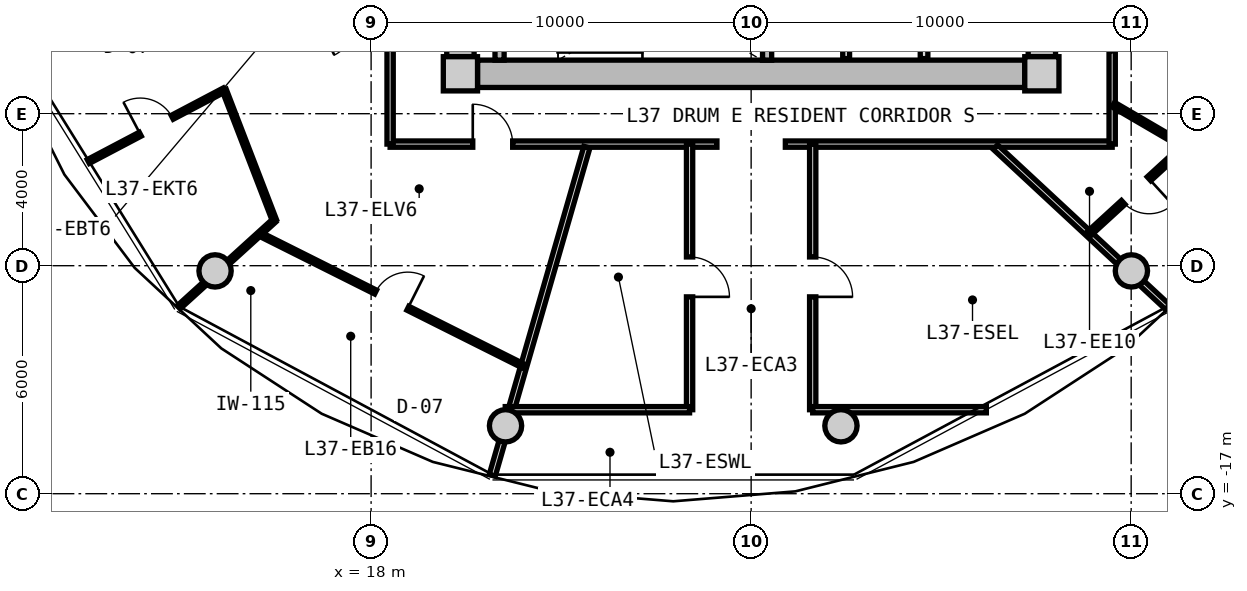
"""IFC4 building model, lengths in metres.
Left out: names, types, materials, properties, quantities, classifications, styles, units other than length and angle.
Written with IfcOpenShell. Run it as: python <this file> out.ifc"""

import sys

from ifc_helpers import new_model, si_unit, direction, frame, frame_2d, origin, origin_2d, place, context, subcontext, project, spatial, rectangle, circle, extrude, source, transform, mapped, element, fill, save


model = new_model("IFC4")
c1 = context("Model", 3, precision=1e-05, world=origin(), true_north=direction((0.0, 1.0)))
c2 = subcontext(c1, "Body", "Model", "MODEL_VIEW")
j1 = project(units=[si_unit("LENGTHUNIT", "METRE"), si_unit("PLANEANGLEUNIT", "RADIAN")], contexts=[c1])
p1 = place(None, origin())
s1 = spatial("IfcSite", under=j1, at=p1, CompositionType="ELEMENT")
p2 = place(p1, origin())
s2 = spatial("IfcBuilding", under=s1, at=p2, CompositionType="ELEMENT")
p3 = place(p2, frame((0.0, 0.0, 120.65)))
s3 = spatial("IfcBuildingStorey", under=s2, at=p3, CompositionType="ELEMENT", Elevation=120.65)
m1 = source(origin(), c2, "Body", "SweptSolid", [
    extrude(rectangle(XDim=0.9, YDim=0.9, at=origin_2d()), origin(), (0.0, 0.0, 1.0), 3.05),
])
for number, where, z_axis, x_axis in (
    (1, (20.35, -5.95, 0.0), (0.0, 0.0, 1.0), (1.0, 0.0, 0.0)),
    (2, (35.65, -5.95, 0.0), (0.0, 0.0, 1.0), (1.0, 0.0, 0.0)),
):
    element("IfcColumn", number, at=place(p3, frame(where, z_axis=z_axis, x_axis=x_axis)), inside=s3, PredefinedType="COLUMN", context=c2, shape_type="MappedRepresentation", body=[
        mapped(m1, transform((0.0, 0.0, 0.0), x_axis=(1.0, 0.0, 0.0), y_axis=(0.0, 1.0, 0.0), z_axis=(0.0, 0.0, 1.0), scale=1.0)),
    ])
m2 = source(origin(), c2, "Body", "SweptSolid", [
    extrude(rectangle(XDim=14.4, YDim=0.72, at=frame_2d((7.2, 0.0))), origin(), (0.0, 0.0, 1.0), 2.79),
])
p4 = place(p3, frame((35.2, -5.95, 0.0), z_axis=(0.0, 0.0, 1.0), x_axis=(-1.0, 0.0, 0.0)))
e3 = element("IfcWall", 3, at=p4, inside=s3, PredefinedType="SHEAR", context=c2, shape_type="MappedRepresentation", body=[
    mapped(m2, transform((0.0, 0.0, 0.0), x_axis=(1.0, 0.0, 0.0), y_axis=(0.0, 1.0, 0.0), z_axis=(0.0, 0.0, 1.0), scale=1.0)),
])
m3 = source(origin(), c2, "Body", "SweptSolid", [
    extrude(rectangle(XDim=11.0, YDim=0.72, at=frame_2d((5.5, 0.0))), origin(), (0.0, 0.0, 1.0), 2.79),
])
p5 = place(p3, frame((20.35, -5.5, 0.0), z_axis=(0.0, 0.0, 1.0), x_axis=(0.0, 1.0, 0.0)))
e4 = element("IfcWall", 4, at=p5, inside=s3, PredefinedType="SHEAR", context=c2, shape_type="MappedRepresentation", body=[
    mapped(m3, transform((0.0, 0.0, 0.0), x_axis=(1.0, 0.0, 0.0), y_axis=(0.0, 1.0, 0.0), z_axis=(0.0, 0.0, 1.0), scale=1.0)),
])
p6 = place(p5, frame((3.8, 0.0, 0.0)))
e5 = element("IfcOpeningElement", 5, at=p6, cuts=e4, PredefinedType="OPENING", context=c2, shape_type="SweptSolid", body=[
    extrude(rectangle(XDim=1.2, YDim=2.15, at=frame_2d((0.6, 1.075))), frame((0.0, 0.37, 0.0), z_axis=(0.0, -1.0, 0.0), x_axis=(1.0, 0.0, 0.0)), (0.0, 0.0, 1.0), 0.74),
])
p7 = place(p3, frame((35.65, 5.5, 0.0), z_axis=(0.0, 0.0, 1.0), x_axis=(0.0, -1.0, 0.0)))
e6 = element("IfcWall", 6, at=p7, inside=s3, PredefinedType="SHEAR", context=c2, shape_type="MappedRepresentation", body=[
    mapped(m3, transform((0.0, 0.0, 0.0), x_axis=(1.0, 0.0, 0.0), y_axis=(0.0, 1.0, 0.0), z_axis=(0.0, 0.0, 1.0), scale=1.0)),
])
p8 = place(p7, frame((5.65, 0.0, 0.0)))
e7 = element("IfcOpeningElement", 7, at=p8, cuts=e6, PredefinedType="OPENING", context=c2, shape_type="SweptSolid", body=[
    extrude(rectangle(XDim=1.2, YDim=2.15, at=frame_2d((0.6, 1.075))), frame((0.0, 0.37, 0.0), z_axis=(0.0, -1.0, 0.0), x_axis=(1.0, 0.0, 0.0)), (0.0, 0.0, 1.0), 0.74),
])
m4 = source(origin(), c2, "Body", "SweptSolid", [
    extrude(circle(Radius=0.425, at=origin_2d()), origin(), (0.0, 0.0, 1.0), 3.05),
])
for number, where, z_axis, x_axis in (
    (8, (13.894, -11.137, 0.0), (0.0, 0.0, 1.0), (1.0, 0.0, 0.0)),
    (9, (21.537, -15.213, 0.0), (0.0, 0.0, 1.0), (1.0, 0.0, 0.0)),
    (10, (30.363, -15.213, 0.0), (0.0, 0.0, 1.0), (1.0, 0.0, 0.0)),
    (11, (38.006, -11.137, 0.0), (0.0, 0.0, 1.0), (1.0, 0.0, 0.0)),
):
    element("IfcColumn", number, at=place(p3, frame(where, z_axis=z_axis, x_axis=x_axis)), inside=s3, PredefinedType="COLUMN", context=c2, shape_type="MappedRepresentation", body=[
        mapped(m4, transform((0.0, 0.0, 0.0), x_axis=(1.0, 0.0, 0.0), y_axis=(0.0, 1.0, 0.0), z_axis=(0.0, 0.0, 1.0), scale=1.0)),
    ])
m5 = source(origin(), c2, "Body", "SweptSolid", [
    extrude(rectangle(XDim=3.14, YDim=0.24, at=frame_2d((1.57, 0.0))), origin(), (0.0, 0.0, 1.0), 2.79),
])
for number, where, z_axis, x_axis in (
    (12, (21.38, -5.59, 0.0), (0.0, 0.0, 1.0), (0.0, 1.0, 0.0)),
    (13, (28.42, -5.59, 0.0), (0.0, 0.0, 1.0), (0.0, 1.0, 0.0)),
):
    element("IfcWall", number, at=place(p3, frame(where, z_axis=z_axis, x_axis=x_axis)), inside=s3, PredefinedType="PARTITIONING", context=c2, shape_type="MappedRepresentation", body=[
        mapped(m5, transform((0.0, 0.0, 0.0), x_axis=(1.0, 0.0, 0.0), y_axis=(0.0, 1.0, 0.0), z_axis=(0.0, 0.0, 1.0), scale=1.0)),
    ])
m6 = source(origin(), c2, "Body", "SweptSolid", [
    extrude(rectangle(XDim=3.8, YDim=0.2, at=frame_2d((1.9, 0.0))), origin(), (0.0, 0.0, 1.0), 2.775),
])
p9 = place(p3, frame((32.55, -5.55, 0.0), z_axis=(0.0, 0.0, 1.0), x_axis=(0.0, 1.0, 0.0)))
e14 = element("IfcWall", 14, at=p9, inside=s3, PredefinedType="PARTITIONING", context=c2, shape_type="MappedRepresentation", body=[
    mapped(m6, transform((0.0, 0.0, 0.0), x_axis=(1.0, 0.0, 0.0), y_axis=(0.0, 1.0, 0.0), z_axis=(0.0, 0.0, 1.0), scale=1.0)),
])
m7 = source(origin(), c2, "Body", "SweptSolid", [
    extrude(rectangle(XDim=3.22, YDim=0.18, at=frame_2d((1.61, 0.0))), origin(), (0.0, 0.0, 1.0), 2.775),
])
p10 = place(p3, frame((30.5, -5.55, 0.0), z_axis=(0.0, 0.0, 1.0), x_axis=(0.0, 1.0, 0.0)))
e15 = element("IfcWall", 15, at=p10, inside=s3, PredefinedType="PARTITIONING", context=c2, shape_type="MappedRepresentation", body=[
    mapped(m7, transform((0.0, 0.0, 0.0), x_axis=(1.0, 0.0, 0.0), y_axis=(0.0, 1.0, 0.0), z_axis=(0.0, 0.0, 1.0), scale=1.0)),
])
m8 = source(origin(), c2, "Body", "SweptSolid", [
    extrude(rectangle(XDim=8.6, YDim=0.165, at=frame_2d((4.3, 0.0))), origin(), (0.0, 0.0, 1.0), 2.775),
])
p11 = place(p3, frame((37.5, -7.8, 0.0), z_axis=(0.0, 0.0, 1.0), x_axis=(-1.0, 0.0, 0.0)))
e16 = element("IfcWall", 16, at=p11, inside=s3, PredefinedType="PARTITIONING", context=c2, shape_type="MappedRepresentation", body=[
    mapped(m8, transform((0.0, 0.0, 0.0), x_axis=(1.0, 0.0, 0.0), y_axis=(0.0, 1.0, 0.0), z_axis=(0.0, 0.0, 1.0), scale=1.0)),
])
p12 = place(p3, frame((27.1, -7.8, 0.0), z_axis=(0.0, 0.0, 1.0), x_axis=(-1.0, 0.0, 0.0)))
e17 = element("IfcWall", 17, at=p12, inside=s3, PredefinedType="PARTITIONING", context=c2, shape_type="MappedRepresentation", body=[
    mapped(m8, transform((0.0, 0.0, 0.0), x_axis=(1.0, 0.0, 0.0), y_axis=(0.0, 1.0, 0.0), z_axis=(0.0, 0.0, 1.0), scale=1.0)),
])
p13 = place(p12, frame((5.375, 0.0, 0.0)))
e18 = element("IfcOpeningElement", 18, at=p13, cuts=e17, PredefinedType="OPENING", context=c2, shape_type="SweptSolid", body=[
    extrude(rectangle(XDim=1.05, YDim=2.15, at=frame_2d((0.525, 1.075))), frame((0.0, 0.093, 0.0), z_axis=(0.0, -1.0, 0.0), x_axis=(1.0, 0.0, 0.0)), (0.0, 0.0, 1.0), 0.185),
])
m9 = source(origin(), c2, "Body", "SweptSolid", [
    extrude(rectangle(XDim=15.6, YDim=0.165, at=frame_2d((7.8, 0.0))), origin(), (0.0, 0.0, 1.0), 2.775),
])
p14 = place(p3, frame((18.5, -7.8, 0.0), z_axis=(0.0, 0.0, 1.0), x_axis=(0.0, 1.0, 0.0)))
e19 = element("IfcWall", 19, at=p14, inside=s3, PredefinedType="PARTITIONING", context=c2, shape_type="MappedRepresentation", body=[
    mapped(m9, transform((0.0, 0.0, 0.0), x_axis=(1.0, 0.0, 0.0), y_axis=(0.0, 1.0, 0.0), z_axis=(0.0, 0.0, 1.0), scale=1.0)),
])
p15 = place(p14, frame((10.383, 0.0, 0.0)))
e20 = element("IfcOpeningElement", 20, at=p15, cuts=e19, PredefinedType="OPENING", context=c2, shape_type="SweptSolid", body=[
    extrude(rectangle(XDim=1.05, YDim=2.15, at=frame_2d((0.525, 1.075))), frame((0.0, 0.093, 0.0), z_axis=(0.0, -1.0, 0.0), x_axis=(1.0, 0.0, 0.0)), (0.0, 0.0, 1.0), 0.185),
])
p16 = place(p14, frame((6.419, 0.0, 0.0)))
e21 = element("IfcOpeningElement", 21, at=p16, cuts=e19, PredefinedType="OPENING", context=c2, shape_type="SweptSolid", body=[
    extrude(rectangle(XDim=1.05, YDim=2.15, at=frame_2d((0.525, 1.075))), frame((0.0, 0.093, 0.0), z_axis=(0.0, -1.0, 0.0), x_axis=(1.0, 0.0, 0.0)), (0.0, 0.0, 1.0), 0.185),
])
p17 = place(p3, frame((37.5, 7.8, 0.0), z_axis=(0.0, 0.0, 1.0), x_axis=(0.0, -1.0, 0.0)))
e22 = element("IfcWall", 22, at=p17, inside=s3, PredefinedType="PARTITIONING", context=c2, shape_type="MappedRepresentation", body=[
    mapped(m9, transform((0.0, 0.0, 0.0), x_axis=(1.0, 0.0, 0.0), y_axis=(0.0, 1.0, 0.0), z_axis=(0.0, 0.0, 1.0), scale=1.0)),
])
p18 = place(p17, frame((12.094, 0.0, 0.0)))
e23 = element("IfcOpeningElement", 23, at=p18, cuts=e22, PredefinedType="OPENING", context=c2, shape_type="SweptSolid", body=[
    extrude(rectangle(XDim=1.05, YDim=2.15, at=frame_2d((0.525, 1.075))), frame((0.0, 0.093, 0.0), z_axis=(0.0, -1.0, 0.0), x_axis=(1.0, 0.0, 0.0)), (0.0, 0.0, 1.0), 0.185),
])
p19 = place(p17, frame((5.971, 0.0, 0.0)))
e24 = element("IfcOpeningElement", 24, at=p19, cuts=e22, PredefinedType="OPENING", context=c2, shape_type="SweptSolid", body=[
    extrude(rectangle(XDim=1.05, YDim=2.15, at=frame_2d((0.525, 1.075))), frame((0.0, 0.093, 0.0), z_axis=(0.0, -1.0, 0.0), x_axis=(1.0, 0.0, 0.0)), (0.0, 0.0, 1.0), 0.185),
])
p20 = place(p17, frame((3.324, 0.0, 0.0)))
e25 = element("IfcOpeningElement", 25, at=p20, cuts=e22, PredefinedType="OPENING", context=c2, shape_type="SweptSolid", body=[
    extrude(rectangle(XDim=0.92, YDim=2.1, at=frame_2d((0.46, 1.05))), frame((0.0, 0.093, 0.0), z_axis=(0.0, -1.0, 0.0), x_axis=(1.0, 0.0, 0.0)), (0.0, 0.0, 1.0), 0.185),
])
m10 = source(origin(), c2, "Body", "SweptSolid", [
    extrude(rectangle(XDim=8.989, YDim=0.165, at=frame_2d((4.495, 0.0))), origin(), (0.0, 0.0, 1.0), 2.275),
])
p21 = place(p3, frame((23.678, -7.88, 0.0), z_axis=(0.0, 0.0, 1.0), x_axis=(-0.27702323008, -0.960863221274, 0.0)))
e26 = element("IfcWall", 26, at=p21, inside=s3, PredefinedType="PARTITIONING", context=c2, shape_type="MappedRepresentation", body=[
    mapped(m10, transform((0.0, 0.0, 0.0), x_axis=(1.0, 0.0, 0.0), y_axis=(0.0, 1.0, 0.0), z_axis=(0.0, 0.0, 1.0), scale=1.0)),
])
m11 = source(origin(), c2, "Body", "SweptSolid", [
    extrude(rectangle(XDim=6.187, YDim=0.165, at=frame_2d((3.093, 0.0))), origin(), (0.0, 0.0, 1.0), 2.275),
])
p22 = place(p3, frame((34.429, -7.88, 0.0), z_axis=(0.0, 0.0, 1.0), x_axis=(0.732501077882, -0.680765870841, 0.0)))
e27 = element("IfcWall", 27, at=p22, inside=s3, PredefinedType="PARTITIONING", context=c2, shape_type="MappedRepresentation", body=[
    mapped(m11, transform((0.0, 0.0, 0.0), x_axis=(1.0, 0.0, 0.0), y_axis=(0.0, 1.0, 0.0), z_axis=(0.0, 0.0, 1.0), scale=1.0)),
])
m12 = source(origin(), c2, "Body", "SweptSolid", [
    extrude(rectangle(XDim=6.99, YDim=0.165, at=frame_2d((3.495, 0.0))), origin(), (0.0, 0.0, 1.0), 2.775),
])
p23 = place(p3, frame((26.38, -14.79, 0.0), z_axis=(0.0, 0.0, 1.0), x_axis=(0.0, 1.0, 0.0)))
e28 = element("IfcWall", 28, at=p23, inside=s3, PredefinedType="PARTITIONING", context=c2, shape_type="MappedRepresentation", body=[
    mapped(m12, transform((0.0, 0.0, 0.0), x_axis=(1.0, 0.0, 0.0), y_axis=(0.0, 1.0, 0.0), z_axis=(0.0, 0.0, 1.0), scale=1.0)),
])
p24 = place(p23, frame((2.97, 0.0, 0.0)))
e29 = element("IfcOpeningElement", 29, at=p24, cuts=e28, PredefinedType="OPENING", context=c2, shape_type="SweptSolid", body=[
    extrude(rectangle(XDim=1.05, YDim=2.15, at=frame_2d((0.525, 1.075))), frame((0.0, 0.093, 0.0), z_axis=(0.0, -1.0, 0.0), x_axis=(1.0, 0.0, 0.0)), (0.0, 0.0, 1.0), 0.185),
])
m13 = source(origin(), c2, "Body", "SweptSolid", [
    extrude(rectangle(XDim=4.851, YDim=0.165, at=frame_2d((2.425, 0.0))), origin(), (0.0, 0.0, 1.0), 2.775),
])
p25 = place(p3, frame((21.529, -14.79, 0.0), z_axis=(0.0, 0.0, 1.0), x_axis=(1.0, 0.0, 0.0)))
e30 = element("IfcWall", 30, at=p25, inside=s3, PredefinedType="PARTITIONING", context=c2, shape_type="MappedRepresentation", body=[
    mapped(m13, transform((0.0, 0.0, 0.0), x_axis=(1.0, 0.0, 0.0), y_axis=(0.0, 1.0, 0.0), z_axis=(0.0, 0.0, 1.0), scale=1.0)),
])
m14 = source(origin(), c2, "Body", "SweptSolid", [
    extrude(rectangle(XDim=6.99, YDim=0.165, at=frame_2d((3.495, 0.0))), origin(), (0.0, 0.0, 1.0), 2.275),
])
p26 = place(p3, frame((29.62, -14.79, 0.0), z_axis=(0.0, 0.0, 1.0), x_axis=(0.0, 1.0, 0.0)))
e31 = element("IfcWall", 31, at=p26, inside=s3, PredefinedType="PARTITIONING", context=c2, shape_type="MappedRepresentation", body=[
    mapped(m14, transform((0.0, 0.0, 0.0), x_axis=(1.0, 0.0, 0.0), y_axis=(0.0, 1.0, 0.0), z_axis=(0.0, 0.0, 1.0), scale=1.0)),
])
p27 = place(p26, frame((2.97, 0.0, 0.0)))
e32 = element("IfcOpeningElement", 32, at=p27, cuts=e31, PredefinedType="OPENING", context=c2, shape_type="SweptSolid", body=[
    extrude(rectangle(XDim=1.05, YDim=2.15, at=frame_2d((0.525, 1.075))), frame((0.0, 0.093, 0.0), z_axis=(0.0, -1.0, 0.0), x_axis=(1.0, 0.0, 0.0)), (0.0, 0.0, 1.0), 0.185),
])
m15 = source(origin(), c2, "Body", "SweptSolid", [
    extrude(rectangle(XDim=4.569, YDim=0.165, at=frame_2d((2.285, 0.0))), origin(), (0.0, 0.0, 1.0), 2.775),
])
p28 = place(p3, frame((29.62, -14.79, 0.0), z_axis=(0.0, 0.0, 1.0), x_axis=(1.0, 0.0, 0.0)))
e33 = element("IfcWall", 33, at=p28, inside=s3, PredefinedType="PARTITIONING", context=c2, shape_type="MappedRepresentation", body=[
    mapped(m15, transform((0.0, 0.0, 0.0), x_axis=(1.0, 0.0, 0.0), y_axis=(0.0, 1.0, 0.0), z_axis=(0.0, 0.0, 1.0), scale=1.0)),
])
m16 = source(origin(), c2, "Body", "SweptSolid", [
    extrude(rectangle(XDim=7.767, YDim=0.115, at=frame_2d((3.884, 0.0))), origin(), (0.0, 0.0, 1.0), 2.775),
])
p29 = place(p3, frame((15.07, -10.167, 0.0), z_axis=(0.0, 0.0, 1.0), x_axis=(0.894188177352, -0.447691303783, 0.0)))
e34 = element("IfcWall", 34, at=p29, inside=s3, PredefinedType="PARTITIONING", context=c2, shape_type="MappedRepresentation", body=[
    mapped(m16, transform((0.0, 0.0, 0.0), x_axis=(1.0, 0.0, 0.0), y_axis=(0.0, 1.0, 0.0), z_axis=(0.0, 0.0, 1.0), scale=1.0)),
])
p30 = place(p29, frame((3.409, 0.0, 0.0)))
e35 = element("IfcOpeningElement", 35, at=p30, cuts=e34, PredefinedType="OPENING", context=c2, shape_type="SweptSolid", body=[
    extrude(rectangle(XDim=0.95, YDim=2.1, at=frame_2d((0.475, 1.05))), frame((0.0, 0.067, 0.0), z_axis=(0.0, -1.0, 0.0), x_axis=(1.0, 0.0, 0.0)), (0.0, 0.0, 1.0), 0.135),
])
m17 = source(origin(), c2, "Body", "SweptSolid", [
    extrude(rectangle(XDim=3.393, YDim=0.115, at=frame_2d((1.696, 0.0))), origin(), (0.0, 0.0, 1.0), 2.275),
])
p31 = place(p3, frame((15.451, -9.811, 0.0), z_axis=(0.0, 0.0, 1.0), x_axis=(-0.740356690907, -0.672214229416, 0.0)))
e36 = element("IfcWall", 36, at=p31, inside=s3, PredefinedType="PARTITIONING", context=c2, shape_type="MappedRepresentation", body=[
    mapped(m17, transform((0.0, 0.0, 0.0), x_axis=(1.0, 0.0, 0.0), y_axis=(0.0, 1.0, 0.0), z_axis=(0.0, 0.0, 1.0), scale=1.0)),
])
m18 = source(origin(), c2, "Body", "SweptSolid", [
    extrude(rectangle(XDim=4.042, YDim=0.115, at=frame_2d((2.021, 0.0))), origin(), (0.0, 0.0, 1.0), 2.775),
])
p32 = place(p3, frame((14.134, -6.375, 0.0), z_axis=(0.0, 0.0, 1.0), x_axis=(-0.88476748851, -0.466032714812, 0.0)))
e37 = element("IfcWall", 37, at=p32, inside=s3, PredefinedType="PARTITIONING", context=c2, shape_type="MappedRepresentation", body=[
    mapped(m18, transform((0.0, 0.0, 0.0), x_axis=(1.0, 0.0, 0.0), y_axis=(0.0, 1.0, 0.0), z_axis=(0.0, 0.0, 1.0), scale=1.0)),
])
p33 = place(p32, frame((1.546, 0.0, 0.0)))
e38 = element("IfcOpeningElement", 38, at=p33, cuts=e37, PredefinedType="OPENING", context=c2, shape_type="SweptSolid", body=[
    extrude(rectangle(XDim=0.95, YDim=2.1, at=frame_2d((0.475, 1.05))), frame((0.0, 0.067, 0.0), z_axis=(0.0, -1.0, 0.0), x_axis=(1.0, 0.0, 0.0)), (0.0, 0.0, 1.0), 0.135),
])
m19 = source(origin(), c2, "Body", "SweptSolid", [
    extrude(rectangle(XDim=3.677, YDim=0.115, at=frame_2d((1.838, 0.0))), origin(), (0.0, 0.0, 1.0), 2.775),
])
p34 = place(p3, frame((14.134, -6.375, 0.0), z_axis=(0.0, 0.0, 1.0), x_axis=(0.359592980271, -0.933109258629, 0.0)))
e39 = element("IfcWall", 39, at=p34, inside=s3, PredefinedType="PARTITIONING", context=c2, shape_type="MappedRepresentation", body=[
    mapped(m19, transform((0.0, 0.0, 0.0), x_axis=(1.0, 0.0, 0.0), y_axis=(0.0, 1.0, 0.0), z_axis=(0.0, 0.0, 1.0), scale=1.0)),
])
m20 = source(origin(), c2, "Body", "SweptSolid", [
    extrude(rectangle(XDim=2.172, YDim=0.14, at=frame_2d((1.086, 0.0))), origin(), (0.0, 0.0, 1.0), 2.775),
])
p35 = place(p3, frame((37.53, -6.762, 0.0), z_axis=(0.0, 0.0, 1.0), x_axis=(0.863562702562, -0.504241468688, 0.0)))
e40 = element("IfcWall", 40, at=p35, inside=s3, PredefinedType="PARTITIONING", context=c2, shape_type="MappedRepresentation", body=[
    mapped(m20, transform((0.0, 0.0, 0.0), x_axis=(1.0, 0.0, 0.0), y_axis=(0.0, 1.0, 0.0), z_axis=(0.0, 0.0, 1.0), scale=1.0)),
])
m21 = source(origin(), c2, "Body", "SweptSolid", [
    extrude(rectangle(XDim=3.457, YDim=0.14, at=frame_2d((1.729, 0.0))), origin(), (0.0, 0.0, 1.0), 2.775),
])
p36 = place(p3, frame((39.405, -7.857, 0.0), z_axis=(0.0, 0.0, 1.0), x_axis=(-0.737567375492, -0.675273549467, 0.0)))
e41 = element("IfcWall", 41, at=p36, inside=s3, PredefinedType="PARTITIONING", context=c2, shape_type="MappedRepresentation", body=[
    mapped(m21, transform((0.0, 0.0, 0.0), x_axis=(1.0, 0.0, 0.0), y_axis=(0.0, 1.0, 0.0), z_axis=(0.0, 0.0, 1.0), scale=1.0)),
])
p37 = place(p36, frame((1.268, 0.0, 0.0)))
e42 = element("IfcOpeningElement", 42, at=p37, cuts=e41, PredefinedType="OPENING", context=c2, shape_type="SweptSolid", body=[
    extrude(rectangle(XDim=0.92, YDim=2.1, at=frame_2d((0.46, 1.05))), frame((0.0, 0.08, 0.0), z_axis=(0.0, -1.0, 0.0), x_axis=(1.0, 0.0, 0.0)), (0.0, 0.0, 1.0), 0.16),
])
m22 = source(origin(), c2, "Body", "SweptSolid", [
    extrude(rectangle(XDim=1.05, YDim=2.15, at=frame_2d((0.525, 1.075))), frame((0.0, 0.025, 0.0), z_axis=(0.0, -1.0, 0.0), x_axis=(1.0, 0.0, 0.0)), (0.0, 0.0, 1.0), 0.05),
])
p38 = place(p24, frame((1.05, 0.0, 0.0), z_axis=(0.0, 0.0, 1.0), x_axis=(-1.0, 0.0, 0.0)))
e43 = element("IfcDoor", 43, at=p38, inside=s3, OperationType="SINGLE_SWING_RIGHT", PredefinedType="DOOR", context=c2, shape_type="MappedRepresentation", body=[
    mapped(m22, transform((0.0, 0.0, 0.0), x_axis=(1.0, 0.0, 0.0), y_axis=(0.0, 1.0, 0.0), z_axis=(0.0, 0.0, 1.0), scale=1.0)),
])
fill(e29, e43)
p39 = place(p27, frame((1.05, 0.0, 0.0), z_axis=(0.0, 0.0, 1.0), x_axis=(-1.0, 0.0, 0.0)))
e44 = element("IfcDoor", 44, at=p39, inside=s3, OperationType="SINGLE_SWING_RIGHT", PredefinedType="DOOR", context=c2, shape_type="MappedRepresentation", body=[
    mapped(m22, transform((0.0, 0.0, 0.0), x_axis=(1.0, 0.0, 0.0), y_axis=(0.0, 1.0, 0.0), z_axis=(0.0, 0.0, 1.0), scale=1.0)),
])
fill(e32, e44)
p40 = place(p13, frame((1.05, 0.0, 0.0), z_axis=(0.0, 0.0, 1.0), x_axis=(-1.0, 0.0, 0.0)))
e45 = element("IfcDoor", 45, at=p40, inside=s3, OperationType="SINGLE_SWING_LEFT", PredefinedType="DOOR", context=c2, shape_type="MappedRepresentation", body=[
    mapped(m22, transform((0.0, 0.0, 0.0), x_axis=(1.0, 0.0, 0.0), y_axis=(0.0, 1.0, 0.0), z_axis=(0.0, 0.0, 1.0), scale=1.0)),
])
fill(e18, e45)
m23 = source(origin(), c2, "Body", "SweptSolid", [
    extrude(rectangle(XDim=0.95, YDim=2.1, at=frame_2d((0.475, 1.05))), frame((0.0, 0.025, 0.0), z_axis=(0.0, -1.0, 0.0), x_axis=(1.0, 0.0, 0.0)), (0.0, 0.0, 1.0), 0.05),
])
p41 = place(p33, frame((0.95, 0.0, 0.0), z_axis=(0.0, 0.0, 1.0), x_axis=(-1.0, 0.0, 0.0)))
e46 = element("IfcDoor", 46, at=p41, inside=s3, OperationType="SINGLE_SWING_LEFT", PredefinedType="DOOR", context=c2, shape_type="MappedRepresentation", body=[
    mapped(m23, transform((0.0, 0.0, 0.0), x_axis=(1.0, 0.0, 0.0), y_axis=(0.0, 1.0, 0.0), z_axis=(0.0, 0.0, 1.0), scale=1.0)),
])
fill(e38, e46)
p42 = place(p30, origin())
e47 = element("IfcDoor", 47, at=p42, inside=s3, OperationType="SINGLE_SWING_RIGHT", PredefinedType="DOOR", context=c2, shape_type="MappedRepresentation", body=[
    mapped(m23, transform((0.0, 0.0, 0.0), x_axis=(1.0, 0.0, 0.0), y_axis=(0.0, 1.0, 0.0), z_axis=(0.0, 0.0, 1.0), scale=1.0)),
])
fill(e35, e47)
m24 = source(origin(), c2, "Body", "SweptSolid", [
    extrude(rectangle(XDim=0.92, YDim=2.1, at=frame_2d((0.46, 1.05))), frame((0.0, 0.025, 0.0), z_axis=(0.0, -1.0, 0.0), x_axis=(1.0, 0.0, 0.0)), (0.0, 0.0, 1.0), 0.05),
])
p43 = place(p37, origin())
e48 = element("IfcDoor", 48, at=p43, inside=s3, OperationType="SINGLE_SWING_LEFT", PredefinedType="DOOR", context=c2, shape_type="MappedRepresentation", body=[
    mapped(m24, transform((0.0, 0.0, 0.0), x_axis=(1.0, 0.0, 0.0), y_axis=(0.0, 1.0, 0.0), z_axis=(0.0, 0.0, 1.0), scale=1.0)),
])
fill(e42, e48)
save(model, sys.argv[1])
